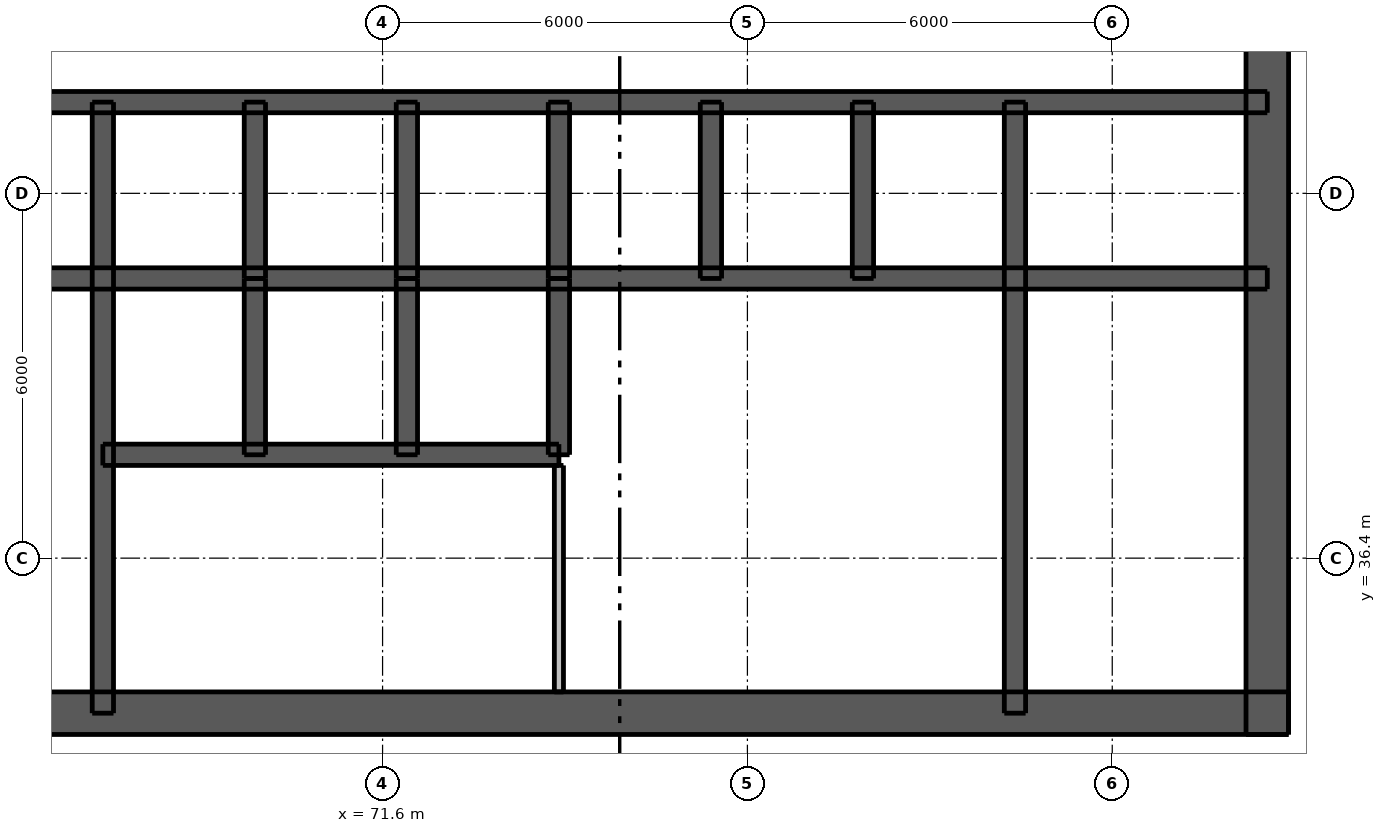
"""IFC4 building model, lengths in metres.
Left out: names, types, materials, properties, quantities, classifications, styles, units other than length and angle.
Written with IfcOpenShell. Run it as: python <this file> out.ifc"""

import sys

from ifc_helpers import new_model, si_unit, direction, frame, frame_2d, origin, place, context, subcontext, project, spatial, rectangle, extrude, element, fill, save


model = new_model("IFC4")
c1 = context("Model", 3, precision=1e-05, world=origin(), true_north=direction((0.0, 1.0)))
c2 = subcontext(c1, "Body", "Model", "MODEL_VIEW")
j1 = project(units=[si_unit("LENGTHUNIT", "METRE"), si_unit("PLANEANGLEUNIT", "RADIAN")], contexts=[c1])
p1 = place(None, origin())
s1 = spatial("IfcSite", under=j1, at=p1, CompositionType="ELEMENT")
p2 = place(p1, origin())
s2 = spatial("IfcBuilding", under=s1, at=p2, CompositionType="ELEMENT")
p3 = place(p2, frame((0.0, 0.0, 133.9)))
s3 = spatial("IfcBuildingStorey", under=s2, at=p3, CompositionType="ELEMENT", Elevation=133.9)
p4 = place(p3, frame((62.5, 33.85, 0.0), z_axis=(0.0, 0.0, 1.0), x_axis=(1.0, 0.0, 0.0)))
e1 = element("IfcWall", 1, at=p4, inside=s3, PredefinedType="SHEAR", context=c2, shape_type="SweptSolid", body=[
    extrude(rectangle(XDim=24.0, YDim=0.7, at=frame_2d((12.0, 0.0))), origin(), (0.0, 0.0, 1.0), 3.05),
])
p5 = place(p4, frame((1.962, 0.0, 0.0)))
e2 = element("IfcOpeningElement", 2, at=p5, cuts=e1, PredefinedType="OPENING", context=c2, shape_type="SweptSolid", body=[
    extrude(rectangle(XDim=1.1, YDim=2.1, at=frame_2d((0.55, 1.05))), frame((0.0, 0.36, 0.0), z_axis=(0.0, -1.0, 0.0), x_axis=(1.0, 0.0, 0.0)), (0.0, 0.0, 1.0), 0.72),
])
p6 = place(p4, frame((20.938, 0.0, 0.0)))
e3 = element("IfcOpeningElement", 3, at=p6, cuts=e1, PredefinedType="OPENING", context=c2, shape_type="SweptSolid", body=[
    extrude(rectangle(XDim=1.1, YDim=2.1, at=frame_2d((0.55, 1.05))), frame((0.0, 0.36, 0.0), z_axis=(0.0, -1.0, 0.0), x_axis=(1.0, 0.0, 0.0)), (0.0, 0.0, 1.0), 0.72),
])
p7 = place(p4, frame((8.0, 0.0, 0.0)))
e4 = element("IfcOpeningElement", 4, at=p7, cuts=e1, PredefinedType="OPENING", context=c2, shape_type="SweptSolid", body=[
    extrude(rectangle(XDim=1.1, YDim=2.1, at=frame_2d((0.55, 1.05))), frame((0.0, 0.36, 0.0), z_axis=(0.0, -1.0, 0.0), x_axis=(1.0, 0.0, 0.0)), (0.0, 0.0, 1.0), 0.72),
])
p8 = place(p4, frame((15.3, 0.0, 0.0)))
e5 = element("IfcOpeningElement", 5, at=p8, cuts=e1, PredefinedType="OPENING", context=c2, shape_type="SweptSolid", body=[
    extrude(rectangle(XDim=0.9, YDim=2.1, at=frame_2d((0.45, 1.05))), frame((0.0, 0.36, 0.0), z_axis=(0.0, -1.0, 0.0), x_axis=(1.0, 0.0, 0.0)), (0.0, 0.0, 1.0), 0.72),
])
p9 = place(p3, frame((86.15, 33.5, 0.0), z_axis=(0.0, 0.0, 1.0), x_axis=(0.0, 1.0, 0.0)))
e6 = element("IfcWall", 6, at=p9, inside=s3, PredefinedType="SHEAR", context=c2, shape_type="SweptSolid", body=[
    extrude(rectangle(XDim=24.0, YDim=0.7, at=frame_2d((12.0, 0.0))), origin(), (0.0, 0.0, 1.0), 3.05),
])
p10 = place(p9, frame((11.2, 0.0, 0.0)))
e7 = element("IfcOpeningElement", 7, at=p10, cuts=e6, PredefinedType="OPENING", context=c2, shape_type="SweptSolid", body=[
    extrude(rectangle(XDim=1.6, YDim=2.1, at=frame_2d((0.8, 1.05))), frame((0.0, 0.36, 0.0), z_axis=(0.0, -1.0, 0.0), x_axis=(1.0, 0.0, 0.0)), (0.0, 0.0, 1.0), 0.72),
])
p11 = place(p3, frame((62.85, 41.0, 0.0), z_axis=(0.0, 0.0, 1.0), x_axis=(1.0, 0.0, 0.0)))
e8 = element("IfcWall", 8, at=p11, inside=s3, PredefinedType="SHEAR", context=c2, shape_type="SweptSolid", body=[
    extrude(rectangle(XDim=23.3, YDim=0.35, at=frame_2d((11.65, 0.0))), origin(), (0.0, 0.0, 1.0), 3.05),
])
p12 = place(p3, frame((62.85, 43.9, 0.0), z_axis=(0.0, 0.0, 1.0), x_axis=(1.0, 0.0, 0.0)))
e9 = element("IfcWall", 9, at=p12, inside=s3, PredefinedType="SHEAR", context=c2, shape_type="SweptSolid", body=[
    extrude(rectangle(XDim=23.3, YDim=0.35, at=frame_2d((11.65, 0.0))), origin(), (0.0, 0.0, 1.0), 3.05),
])
p13 = place(p12, frame((1.06, 0.0, 0.0)))
e10 = element("IfcOpeningElement", 10, at=p13, cuts=e9, PredefinedType="OPENING", context=c2, shape_type="SweptSolid", body=[
    extrude(rectangle(XDim=0.9, YDim=2.1, at=frame_2d((0.45, 1.05))), frame((0.0, 0.185, 0.0), z_axis=(0.0, -1.0, 0.0), x_axis=(1.0, 0.0, 0.0)), (0.0, 0.0, 1.0), 0.37),
])
p14 = place(p12, frame((2.923, 0.0, 0.0)))
e11 = element("IfcOpeningElement", 11, at=p14, cuts=e9, PredefinedType="OPENING", context=c2, shape_type="SweptSolid", body=[
    extrude(rectangle(XDim=0.8, YDim=2.1, at=frame_2d((0.4, 1.05))), frame((0.0, 0.185, 0.0), z_axis=(0.0, -1.0, 0.0), x_axis=(1.0, 0.0, 0.0)), (0.0, 0.0, 1.0), 0.37),
])
p15 = place(p12, frame((20.688, 0.0, 0.0)))
e12 = element("IfcOpeningElement", 12, at=p15, cuts=e9, PredefinedType="OPENING", context=c2, shape_type="SweptSolid", body=[
    extrude(rectangle(XDim=0.9, YDim=2.1, at=frame_2d((0.45, 1.05))), frame((0.0, 0.185, 0.0), z_axis=(0.0, -1.0, 0.0), x_axis=(1.0, 0.0, 0.0)), (0.0, 0.0, 1.0), 0.37),
])
p16 = place(p12, frame((4.85, 0.0, 0.0)))
e13 = element("IfcOpeningElement", 13, at=p16, cuts=e9, PredefinedType="OPENING", context=c2, shape_type="SweptSolid", body=[
    extrude(rectangle(XDim=1.1, YDim=2.1, at=frame_2d((0.55, 1.05))), frame((0.0, 0.185, 0.0), z_axis=(0.0, -1.0, 0.0), x_axis=(1.0, 0.0, 0.0)), (0.0, 0.0, 1.0), 0.37),
])
p17 = place(p12, frame((7.35, 0.0, 0.0)))
e14 = element("IfcOpeningElement", 14, at=p17, cuts=e9, PredefinedType="OPENING", context=c2, shape_type="SweptSolid", body=[
    extrude(rectangle(XDim=1.1, YDim=2.1, at=frame_2d((0.55, 1.05))), frame((0.0, 0.185, 0.0), z_axis=(0.0, -1.0, 0.0), x_axis=(1.0, 0.0, 0.0)), (0.0, 0.0, 1.0), 0.37),
])
p18 = place(p12, frame((9.85, 0.0, 0.0)))
e15 = element("IfcOpeningElement", 15, at=p18, cuts=e9, PredefinedType="OPENING", context=c2, shape_type="SweptSolid", body=[
    extrude(rectangle(XDim=1.1, YDim=2.1, at=frame_2d((0.55, 1.05))), frame((0.0, 0.185, 0.0), z_axis=(0.0, -1.0, 0.0), x_axis=(1.0, 0.0, 0.0)), (0.0, 0.0, 1.0), 0.37),
])
p19 = place(p12, frame((12.35, 0.0, 0.0)))
e16 = element("IfcOpeningElement", 16, at=p19, cuts=e9, PredefinedType="OPENING", context=c2, shape_type="SweptSolid", body=[
    extrude(rectangle(XDim=1.1, YDim=2.1, at=frame_2d((0.55, 1.05))), frame((0.0, 0.185, 0.0), z_axis=(0.0, -1.0, 0.0), x_axis=(1.0, 0.0, 0.0)), (0.0, 0.0, 1.0), 0.37),
])
p20 = place(p12, frame((14.85, 0.0, 0.0)))
e17 = element("IfcOpeningElement", 17, at=p20, cuts=e9, PredefinedType="OPENING", context=c2, shape_type="SweptSolid", body=[
    extrude(rectangle(XDim=1.1, YDim=2.1, at=frame_2d((0.55, 1.05))), frame((0.0, 0.185, 0.0), z_axis=(0.0, -1.0, 0.0), x_axis=(1.0, 0.0, 0.0)), (0.0, 0.0, 1.0), 0.37),
])
p21 = place(p12, frame((17.35, 0.0, 0.0)))
e18 = element("IfcOpeningElement", 18, at=p21, cuts=e9, PredefinedType="OPENING", context=c2, shape_type="SweptSolid", body=[
    extrude(rectangle(XDim=1.1, YDim=2.1, at=frame_2d((0.55, 1.05))), frame((0.0, 0.185, 0.0), z_axis=(0.0, -1.0, 0.0), x_axis=(1.0, 0.0, 0.0)), (0.0, 0.0, 1.0), 0.37),
])
p22 = place(p3, frame((67.0, 33.85, 0.0), z_axis=(0.0, 0.0, 1.0), x_axis=(0.0, 1.0, 0.0)))
e19 = element("IfcWall", 19, at=p22, inside=s3, PredefinedType="SHEAR", context=c2, shape_type="SweptSolid", body=[
    extrude(rectangle(XDim=10.05, YDim=0.35, at=frame_2d((5.025, 0.0))), origin(), (0.0, 0.0, 1.0), 3.05),
])
p23 = place(p22, frame((0.55, 0.0, 0.0)))
e20 = element("IfcOpeningElement", 20, at=p23, cuts=e19, PredefinedType="OPENING", context=c2, shape_type="SweptSolid", body=[
    extrude(rectangle(XDim=1.1, YDim=2.1, at=frame_2d((0.55, 1.05))), frame((0.0, 0.185, 0.0), z_axis=(0.0, -1.0, 0.0), x_axis=(1.0, 0.0, 0.0)), (0.0, 0.0, 1.0), 0.37),
])
p24 = place(p3, frame((82.0, 33.85, 0.0), z_axis=(0.0, 0.0, 1.0), x_axis=(0.0, 1.0, 0.0)))
e21 = element("IfcWall", 21, at=p24, inside=s3, PredefinedType="SHEAR", context=c2, shape_type="SweptSolid", body=[
    extrude(rectangle(XDim=10.05, YDim=0.35, at=frame_2d((5.025, 0.0))), origin(), (0.0, 0.0, 1.0), 3.05),
])
for number, where, z_axis, x_axis in (
    (22, (69.5, 41.0, 0.0), (0.0, 0.0, 1.0), (0.0, 1.0, 0.0)),
    (23, (72.0, 41.0, 0.0), (0.0, 0.0, 1.0), (0.0, 1.0, 0.0)),
    (24, (74.5, 41.0, 0.0), (0.0, 0.0, 1.0), (0.0, 1.0, 0.0)),
    (25, (77.0, 41.0, 0.0), (0.0, 0.0, 1.0), (0.0, 1.0, 0.0)),
    (26, (79.5, 41.0, 0.0), (0.0, 0.0, 1.0), (0.0, 1.0, 0.0)),
):
    element("IfcWall", number, at=place(p3, frame(where, z_axis=z_axis, x_axis=x_axis)), inside=s3, PredefinedType="SHEAR", context=c2, shape_type="SweptSolid", body=[
        extrude(rectangle(XDim=2.9, YDim=0.35, at=frame_2d((1.45, 0.0))), origin(), (0.0, 0.0, 1.0), 3.05),
    ])
p25 = place(p3, frame((67.0, 38.1, 0.0), z_axis=(0.0, 0.0, 1.0), x_axis=(1.0, 0.0, 0.0)))
e27 = element("IfcWall", 27, at=p25, inside=s3, PredefinedType="SHEAR", context=c2, shape_type="SweptSolid", body=[
    extrude(rectangle(XDim=7.5, YDim=0.35, at=frame_2d((3.75, 0.0))), origin(), (0.0, 0.0, 1.0), 3.05),
])
p26 = place(p25, frame((0.7, 0.0, 0.0)))
e28 = element("IfcOpeningElement", 28, at=p26, cuts=e27, PredefinedType="OPENING", context=c2, shape_type="SweptSolid", body=[
    extrude(rectangle(XDim=1.1, YDim=2.1, at=frame_2d((0.55, 1.05))), frame((0.0, 0.185, 0.0), z_axis=(0.0, -1.0, 0.0), x_axis=(1.0, 0.0, 0.0)), (0.0, 0.0, 1.0), 0.37),
])
p27 = place(p25, frame((3.2, 0.0, 0.0)))
e29 = element("IfcOpeningElement", 29, at=p27, cuts=e27, PredefinedType="OPENING", context=c2, shape_type="SweptSolid", body=[
    extrude(rectangle(XDim=1.1, YDim=2.1, at=frame_2d((0.55, 1.05))), frame((0.0, 0.185, 0.0), z_axis=(0.0, -1.0, 0.0), x_axis=(1.0, 0.0, 0.0)), (0.0, 0.0, 1.0), 0.37),
])
p28 = place(p25, frame((5.65, 0.0, 0.0)))
e30 = element("IfcOpeningElement", 30, at=p28, cuts=e27, PredefinedType="OPENING", context=c2, shape_type="SweptSolid", body=[
    extrude(rectangle(XDim=1.2, YDim=2.1, at=frame_2d((0.6, 1.05))), frame((0.0, 0.185, 0.0), z_axis=(0.0, -1.0, 0.0), x_axis=(1.0, 0.0, 0.0)), (0.0, 0.0, 1.0), 0.37),
])
for number, where, z_axis, x_axis in (
    (31, (69.5, 38.1, 0.0), (0.0, 0.0, 1.0), (0.0, 1.0, 0.0)),
    (32, (72.0, 38.1, 0.0), (0.0, 0.0, 1.0), (0.0, 1.0, 0.0)),
    (33, (74.5, 38.1, 0.0), (0.0, 0.0, 1.0), (0.0, 1.0, 0.0)),
):
    element("IfcWall", number, at=place(p3, frame(where, z_axis=z_axis, x_axis=x_axis)), inside=s3, PredefinedType="SHEAR", context=c2, shape_type="SweptSolid", body=[
        extrude(rectangle(XDim=2.9, YDim=0.35, at=frame_2d((1.45, 0.0))), origin(), (0.0, 0.0, 1.0), 3.05),
    ])
p29 = place(p3, frame((74.5, 34.2, 0.0), z_axis=(0.0, 0.0, 1.0), x_axis=(0.0, 1.0, 0.0)))
e34 = element("IfcWall", 34, at=p29, inside=s3, PredefinedType="PLUMBINGWALL", context=c2, shape_type="SweptSolid", body=[
    extrude(rectangle(XDim=3.725, YDim=0.15, at=frame_2d((1.863, 0.0))), origin(), (0.0, 0.0, 1.0), 3.05),
])
p30 = place(p6, origin())
e35 = element("IfcDoor", 35, at=p30, inside=s3, OperationType="SINGLE_SWING_RIGHT", PredefinedType="DOOR", context=c2, shape_type="SweptSolid", body=[
    extrude(rectangle(XDim=1.1, YDim=2.1, at=frame_2d((0.55, 1.05))), frame((0.0, 0.337, 0.0), z_axis=(0.0, -1.0, 0.0), x_axis=(1.0, 0.0, 0.0)), (0.0, 0.0, 1.0), 0.05),
])
fill(e3, e35)
p31 = place(p10, origin())
e36 = element("IfcDoor", 36, at=p31, inside=s3, OperationType="DOUBLE_DOOR_SINGLE_SWING", PredefinedType="DOOR", context=c2, shape_type="SweptSolid", body=[
    extrude(rectangle(XDim=1.6, YDim=2.1, at=frame_2d((0.8, 1.05))), frame((0.0, 0.337, 0.0), z_axis=(0.0, -1.0, 0.0), x_axis=(1.0, 0.0, 0.0)), (0.0, 0.0, 1.0), 0.05),
])
fill(e7, e36)
p32 = place(p7, origin())
e37 = element("IfcDoor", 37, at=p32, inside=s3, OperationType="SINGLE_SWING_LEFT", PredefinedType="DOOR", context=c2, shape_type="SweptSolid", body=[
    extrude(rectangle(XDim=1.1, YDim=2.1, at=frame_2d((0.55, 1.05))), frame((0.0, 0.337, 0.0), z_axis=(0.0, -1.0, 0.0), x_axis=(1.0, 0.0, 0.0)), (0.0, 0.0, 1.0), 0.05),
])
fill(e4, e37)
p33 = place(p23, origin())
e38 = element("IfcDoor", 38, at=p33, inside=s3, OperationType="SINGLE_SWING_RIGHT", PredefinedType="DOOR", context=c2, shape_type="SweptSolid", body=[
    extrude(rectangle(XDim=1.1, YDim=2.1, at=frame_2d((0.55, 1.05))), frame((0.0, -0.112, 0.0), z_axis=(0.0, -1.0, 0.0), x_axis=(1.0, 0.0, 0.0)), (0.0, 0.0, 1.0), 0.05),
])
fill(e20, e38)
p34 = place(p8, origin())
e39 = element("IfcDoor", 39, at=p34, inside=s3, OperationType="SINGLE_SWING_LEFT", PredefinedType="DOOR", context=c2, shape_type="SweptSolid", body=[
    extrude(rectangle(XDim=0.9, YDim=2.1, at=frame_2d((0.45, 1.05))), frame((0.0, 0.337, 0.0), z_axis=(0.0, -1.0, 0.0), x_axis=(1.0, 0.0, 0.0)), (0.0, 0.0, 1.0), 0.05),
])
fill(e5, e39)
p35 = place(p14, origin())
e40 = element("IfcDoor", 40, at=p35, inside=s3, OperationType="SINGLE_SWING_RIGHT", PredefinedType="DOOR", context=c2, shape_type="SweptSolid", body=[
    extrude(rectangle(XDim=0.8, YDim=2.1, at=frame_2d((0.4, 1.05))), frame((0.0, -0.112, 0.0), z_axis=(0.0, -1.0, 0.0), x_axis=(1.0, 0.0, 0.0)), (0.0, 0.0, 1.0), 0.05),
])
fill(e11, e40)
p36 = place(p15, origin())
e41 = element("IfcDoor", 41, at=p36, inside=s3, OperationType="SINGLE_SWING_LEFT", PredefinedType="DOOR", context=c2, shape_type="SweptSolid", body=[
    extrude(rectangle(XDim=0.9, YDim=2.1, at=frame_2d((0.45, 1.05))), frame((0.0, -0.112, 0.0), z_axis=(0.0, -1.0, 0.0), x_axis=(1.0, 0.0, 0.0)), (0.0, 0.0, 1.0), 0.05),
])
fill(e12, e41)
p37 = place(p16, origin())
e42 = element("IfcDoor", 42, at=p37, inside=s3, OperationType="DOUBLE_DOOR_SLIDING", PredefinedType="DOOR", context=c2, shape_type="SweptSolid", body=[
    extrude(rectangle(XDim=1.1, YDim=2.1, at=frame_2d((0.55, 1.05))), frame((0.0, 0.025, 0.0), z_axis=(0.0, -1.0, 0.0), x_axis=(1.0, 0.0, 0.0)), (0.0, 0.0, 1.0), 0.05),
])
fill(e13, e42)
p38 = place(p17, origin())
e43 = element("IfcDoor", 43, at=p38, inside=s3, OperationType="DOUBLE_DOOR_SLIDING", PredefinedType="DOOR", context=c2, shape_type="SweptSolid", body=[
    extrude(rectangle(XDim=1.1, YDim=2.1, at=frame_2d((0.55, 1.05))), frame((0.0, 0.025, 0.0), z_axis=(0.0, -1.0, 0.0), x_axis=(1.0, 0.0, 0.0)), (0.0, 0.0, 1.0), 0.05),
])
fill(e14, e43)
p39 = place(p18, origin())
e44 = element("IfcDoor", 44, at=p39, inside=s3, OperationType="DOUBLE_DOOR_SLIDING", PredefinedType="DOOR", context=c2, shape_type="SweptSolid", body=[
    extrude(rectangle(XDim=1.1, YDim=2.1, at=frame_2d((0.55, 1.05))), frame((0.0, 0.025, 0.0), z_axis=(0.0, -1.0, 0.0), x_axis=(1.0, 0.0, 0.0)), (0.0, 0.0, 1.0), 0.05),
])
fill(e15, e44)
p40 = place(p19, origin())
e45 = element("IfcDoor", 45, at=p40, inside=s3, OperationType="DOUBLE_DOOR_SLIDING", PredefinedType="DOOR", context=c2, shape_type="SweptSolid", body=[
    extrude(rectangle(XDim=1.1, YDim=2.1, at=frame_2d((0.55, 1.05))), frame((0.0, 0.025, 0.0), z_axis=(0.0, -1.0, 0.0), x_axis=(1.0, 0.0, 0.0)), (0.0, 0.0, 1.0), 0.05),
])
fill(e16, e45)
p41 = place(p20, origin())
e46 = element("IfcDoor", 46, at=p41, inside=s3, OperationType="DOUBLE_DOOR_SLIDING", PredefinedType="DOOR", context=c2, shape_type="SweptSolid", body=[
    extrude(rectangle(XDim=1.1, YDim=2.1, at=frame_2d((0.55, 1.05))), frame((0.0, 0.025, 0.0), z_axis=(0.0, -1.0, 0.0), x_axis=(1.0, 0.0, 0.0)), (0.0, 0.0, 1.0), 0.05),
])
fill(e17, e46)
p42 = place(p21, origin())
e47 = element("IfcDoor", 47, at=p42, inside=s3, OperationType="DOUBLE_DOOR_SLIDING", PredefinedType="DOOR", context=c2, shape_type="SweptSolid", body=[
    extrude(rectangle(XDim=1.1, YDim=2.1, at=frame_2d((0.55, 1.05))), frame((0.0, 0.025, 0.0), z_axis=(0.0, -1.0, 0.0), x_axis=(1.0, 0.0, 0.0)), (0.0, 0.0, 1.0), 0.05),
])
fill(e18, e47)
p43 = place(p26, origin())
e48 = element("IfcDoor", 48, at=p43, inside=s3, OperationType="DOUBLE_DOOR_SLIDING", PredefinedType="DOOR", context=c2, shape_type="SweptSolid", body=[
    extrude(rectangle(XDim=1.1, YDim=2.1, at=frame_2d((0.55, 1.05))), frame((0.0, 0.025, 0.0), z_axis=(0.0, -1.0, 0.0), x_axis=(1.0, 0.0, 0.0)), (0.0, 0.0, 1.0), 0.05),
])
fill(e28, e48)
p44 = place(p27, origin())
e49 = element("IfcDoor", 49, at=p44, inside=s3, OperationType="DOUBLE_DOOR_SLIDING", PredefinedType="DOOR", context=c2, shape_type="SweptSolid", body=[
    extrude(rectangle(XDim=1.1, YDim=2.1, at=frame_2d((0.55, 1.05))), frame((0.0, 0.025, 0.0), z_axis=(0.0, -1.0, 0.0), x_axis=(1.0, 0.0, 0.0)), (0.0, 0.0, 1.0), 0.05),
])
fill(e29, e49)
p45 = place(p28, origin())
e50 = element("IfcDoor", 50, at=p45, inside=s3, OperationType="DOUBLE_DOOR_SLIDING", PredefinedType="DOOR", context=c2, shape_type="SweptSolid", body=[
    extrude(rectangle(XDim=1.2, YDim=2.1, at=frame_2d((0.6, 1.05))), frame((0.0, 0.025, 0.0), z_axis=(0.0, -1.0, 0.0), x_axis=(1.0, 0.0, 0.0)), (0.0, 0.0, 1.0), 0.05),
])
fill(e30, e50)
save(model, sys.argv[1])
